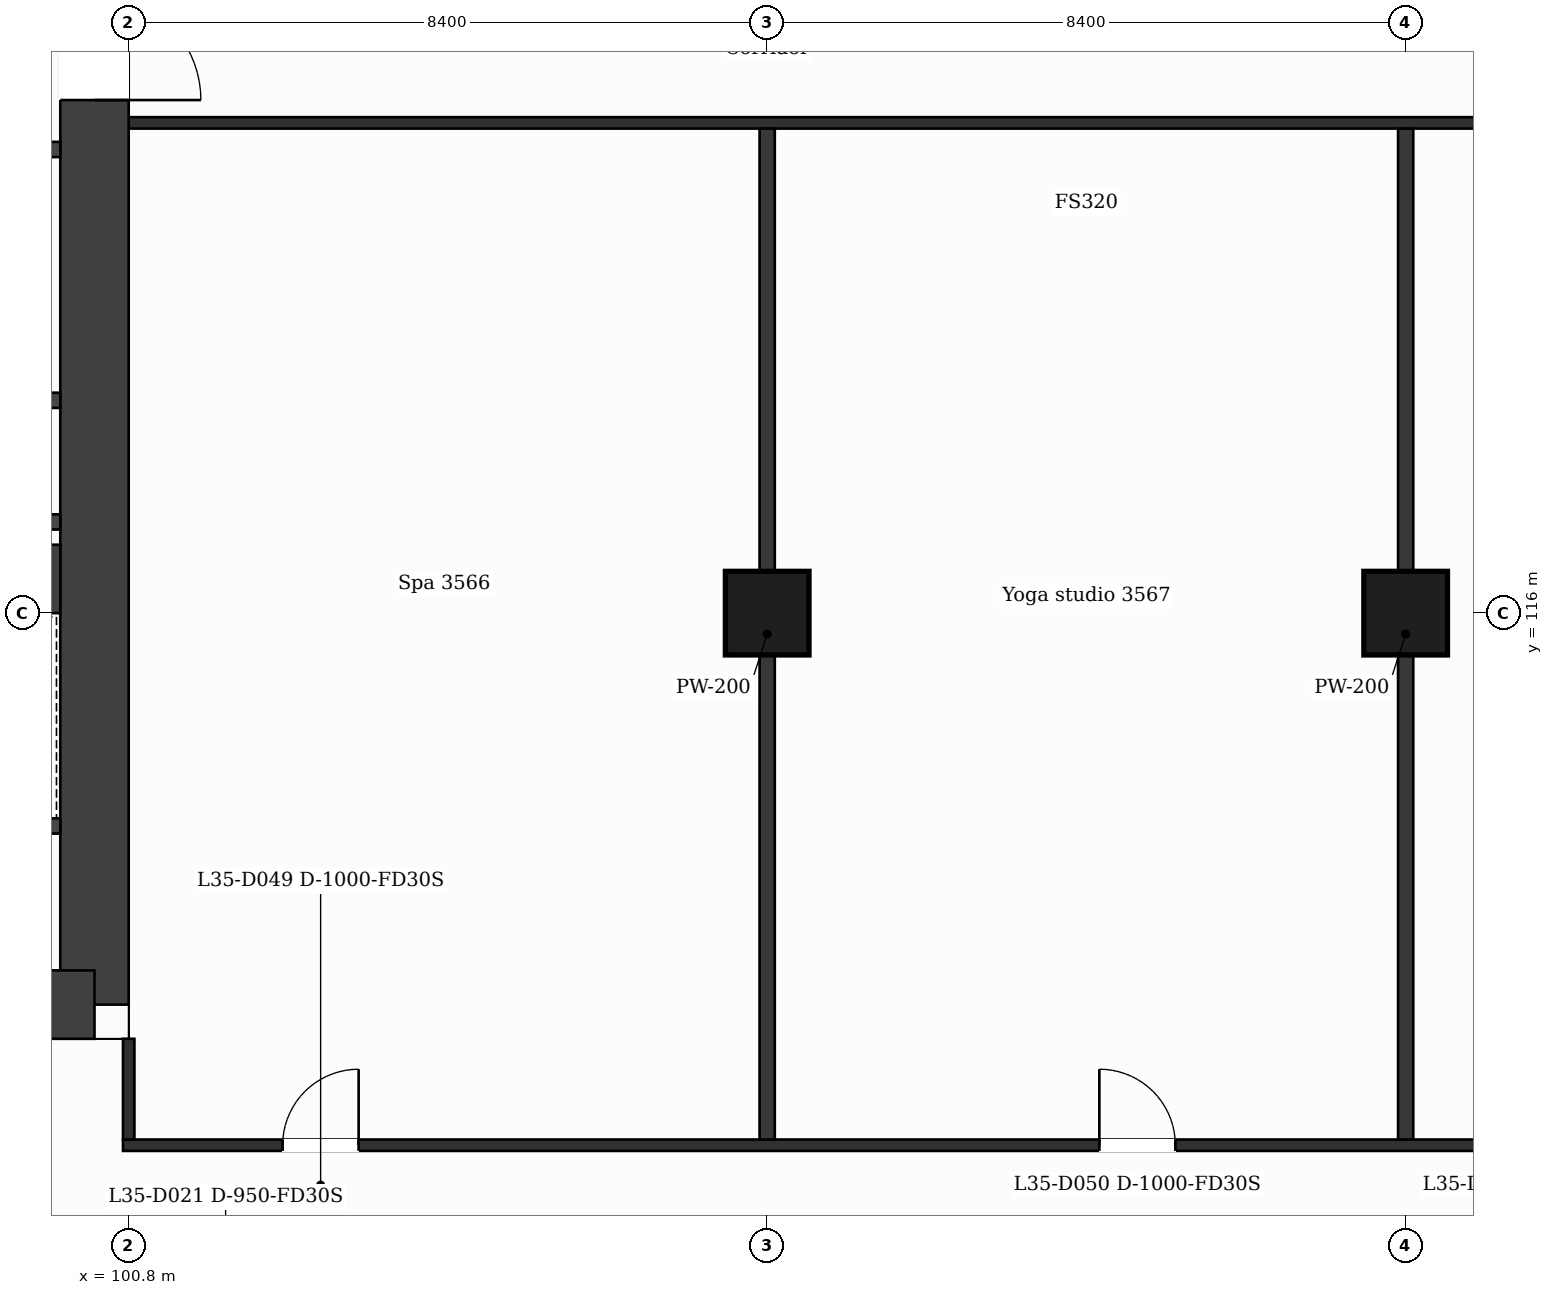
"""IFC4 building model, lengths in metres.
Left out: names, types, materials, properties, quantities, classifications, styles, units other than length and angle.
Written with IfcOpenShell. Run it as: python <this file> out.ifc"""

import sys

from ifc_helpers import new_model, si_unit, direction, frame, frame_2d, origin, origin_2d, place, context, subcontext, project, spatial, rectangle, extrude, element, fill, save


model = new_model("IFC4")
c1 = context("Model", 3, precision=1e-05, world=origin(), true_north=direction((0.0, 1.0)))
c2 = subcontext(c1, "Body", "Model", "MODEL_VIEW")
j1 = project(units=[si_unit("LENGTHUNIT", "METRE"), si_unit("PLANEANGLEUNIT", "RADIAN")], contexts=[c1])
p1 = place(None, origin())
s1 = spatial("IfcSite", under=j1, at=p1, CompositionType="ELEMENT")
p2 = place(p1, origin())
s2 = spatial("IfcBuilding", under=s1, at=p2, CompositionType="ELEMENT")
p3 = place(p2, frame((0.0, 0.0, 151.5)))
s3 = spatial("IfcBuildingStorey", under=s2, at=p3, CompositionType="ELEMENT", Elevation=151.5)
p4 = place(p3, frame((100.35, 131.95, 0.0), z_axis=(0.0, 0.0, 1.0), x_axis=(0.0, -1.0, 0.0)))
e1 = element("IfcWall", 1, at=p4, inside=s3, PredefinedType="SHEAR", context=c2, shape_type="SweptSolid", body=[
    extrude(rectangle(XDim=21.1, YDim=0.9, at=frame_2d((10.55, 0.0))), origin(), (0.0, 0.0, 1.0), 3.7),
])
p5 = place(p4, frame((7.8, 0.0, 0.0)))
e2 = element("IfcOpeningElement", 2, at=p5, cuts=e1, PredefinedType="OPENING", context=c2, shape_type="SweptSolid", body=[
    extrude(rectangle(XDim=1.4, YDim=2.1, at=frame_2d((0.7, 1.05))), frame((0.0, 0.46, 0.0), z_axis=(0.0, -1.0, 0.0), x_axis=(1.0, 0.0, 0.0)), (0.0, 0.0, 1.0), 0.92),
])
p6 = place(p3, frame((100.35, 110.85, 0.0), z_axis=(0.0, 0.0, 1.0), x_axis=(-1.0, 0.0, 0.0)))
e3 = element("IfcWall", 3, at=p6, inside=s3, PredefinedType="SHEAR", context=c2, shape_type="SweptSolid", body=[
    extrude(rectangle(XDim=14.166, YDim=0.9, at=frame_2d((7.083, 0.0))), origin(), (0.0, 0.0, 1.0), 3.7),
])
p7 = place(p6, frame((5.855, 0.0, 0.0)))
e4 = element("IfcOpeningElement", 4, at=p7, cuts=e3, PredefinedType="OPENING", context=c2, shape_type="SweptSolid", body=[
    extrude(rectangle(XDim=1.4, YDim=2.1, at=frame_2d((0.7, 1.05))), frame((0.0, 0.46, 0.0), z_axis=(0.0, -1.0, 0.0), x_axis=(1.0, 0.0, 0.0)), (0.0, 0.0, 1.0), 0.92),
])
p8 = place(p3, frame((94.8, 116.45, 0.0), z_axis=(0.0, 0.0, 1.0), x_axis=(1.0, 0.0, 0.0)))
e5 = element("IfcWall", 5, at=p8, inside=s3, PredefinedType="SHEAR", context=c2, shape_type="SweptSolid", body=[
    extrude(rectangle(XDim=5.1, YDim=0.9, at=frame_2d((2.55, 0.0))), origin(), (0.0, 0.0, 1.0), 3.7),
])
for number, where, z_axis, x_axis in (
    (6, (109.2, 116.0, 0.0), (0.0, 0.0, 1.0), (1.0, 0.0, 0.0)),
    (7, (117.6, 116.0, 0.0), (0.0, 0.0, 1.0), (1.0, 0.0, 0.0)),
):
    element("IfcColumn", number, at=place(p3, frame(where, z_axis=z_axis, x_axis=x_axis)), inside=s3, PredefinedType="COLUMN", context=c2, shape_type="SweptSolid", body=[
        extrude(rectangle(XDim=1.1, YDim=1.1, at=origin_2d()), origin(), (0.0, 0.0, 1.0), 3.7),
    ])
p9 = place(p3, frame((100.725, 109.0, 0.0), z_axis=(0.0, 0.0, 1.0), x_axis=(1.0, 0.0, 0.0)))
e8 = element("IfcWall", 8, at=p9, inside=s3, PredefinedType="PARTITIONING", context=c2, shape_type="SweptSolid", body=[
    extrude(rectangle(XDim=25.35, YDim=0.15, at=frame_2d((12.675, 0.0))), origin(), (0.0, 0.0, 1.0), 3.38),
])
p10 = place(p9, frame((2.1, 0.0, 0.0)))
e9 = element("IfcOpeningElement", 9, at=p10, cuts=e8, PredefinedType="OPENING", context=c2, shape_type="SweptSolid", body=[
    extrude(rectangle(XDim=1.0, YDim=2.1, at=frame_2d((0.5, 1.05))), frame((0.0, 0.085, 0.0), z_axis=(0.0, -1.0, 0.0), x_axis=(1.0, 0.0, 0.0)), (0.0, 0.0, 1.0), 0.17),
])
p11 = place(p9, frame((12.845, 0.0, 0.0)))
e10 = element("IfcOpeningElement", 10, at=p11, cuts=e8, PredefinedType="OPENING", context=c2, shape_type="SweptSolid", body=[
    extrude(rectangle(XDim=1.0, YDim=2.1, at=frame_2d((0.5, 1.05))), frame((0.0, 0.085, 0.0), z_axis=(0.0, -1.0, 0.0), x_axis=(1.0, 0.0, 0.0)), (0.0, 0.0, 1.0), 0.17),
])
p12 = place(p9, frame((18.225, 0.0, 0.0)))
e11 = element("IfcOpeningElement", 11, at=p12, cuts=e8, PredefinedType="OPENING", context=c2, shape_type="SweptSolid", body=[
    extrude(rectangle(XDim=1.0, YDim=2.1, at=frame_2d((0.5, 1.05))), frame((0.0, 0.085, 0.0), z_axis=(0.0, -1.0, 0.0), x_axis=(1.0, 0.0, 0.0)), (0.0, 0.0, 1.0), 0.17),
])
p13 = place(p9, frame((22.675, 0.0, 0.0)))
e12 = element("IfcOpeningElement", 12, at=p13, cuts=e8, PredefinedType="OPENING", context=c2, shape_type="SweptSolid", body=[
    extrude(rectangle(XDim=1.0, YDim=2.1, at=frame_2d((0.5, 1.05))), frame((0.0, 0.085, 0.0), z_axis=(0.0, -1.0, 0.0), x_axis=(1.0, 0.0, 0.0)), (0.0, 0.0, 1.0), 0.17),
])
p14 = place(p3, frame((95.127, 113.2, 0.0), z_axis=(0.0, 0.0, 1.0), x_axis=(1.0, 0.0, 0.0)))
e13 = element("IfcWall", 13, at=p14, inside=s3, PredefinedType="PARTITIONING", context=c2, shape_type="SweptSolid", body=[
    extrude(rectangle(XDim=4.773, YDim=0.2, at=frame_2d((2.386, 0.0))), origin(), (0.0, 0.0, 1.0), 3.38),
])
p15 = place(p14, frame((2.921, 0.0, 0.0)))
e14 = element("IfcOpeningElement", 14, at=p15, cuts=e13, PredefinedType="OPENING", context=c2, shape_type="SweptSolid", body=[
    extrude(rectangle(XDim=1.1, YDim=2.1, at=frame_2d((0.55, 1.05))), frame((0.0, 0.11, 0.0), z_axis=(0.0, -1.0, 0.0), x_axis=(1.0, 0.0, 0.0)), (0.0, 0.0, 1.0), 0.22),
])
for number, where, z_axis, x_axis in (
    (15, (95.227, 117.2, 0.0), (0.0, 0.0, 1.0), (1.0, 0.0, 0.0)),
    (16, (95.227, 118.8, 0.0), (0.0, 0.0, 1.0), (1.0, 0.0, 0.0)),
):
    element("IfcWall", number, at=place(p3, frame(where, z_axis=z_axis, x_axis=x_axis)), inside=s3, PredefinedType="PARTITIONING", context=c2, shape_type="SweptSolid", body=[
        extrude(rectangle(XDim=4.673, YDim=0.2, at=frame_2d((2.336, 0.0))), origin(), (0.0, 0.0, 1.0), 3.38),
    ])
p16 = place(p3, frame((95.227, 122.1, 0.0), z_axis=(0.0, 0.0, 1.0), x_axis=(1.0, 0.0, 0.0)))
e17 = element("IfcWall", 17, at=p16, inside=s3, PredefinedType="PARTITIONING", context=c2, shape_type="SweptSolid", body=[
    extrude(rectangle(XDim=4.673, YDim=0.2, at=frame_2d((2.336, 0.0))), origin(), (0.0, 0.0, 1.0), 3.38),
])
p17 = place(p16, frame((0.718, 0.0, 0.0)))
e18 = element("IfcOpeningElement", 18, at=p17, cuts=e17, PredefinedType="OPENING", context=c2, shape_type="SweptSolid", body=[
    extrude(rectangle(XDim=0.9, YDim=2.1, at=frame_2d((0.45, 1.05))), frame((0.0, 0.11, 0.0), z_axis=(0.0, -1.0, 0.0), x_axis=(1.0, 0.0, 0.0)), (0.0, 0.0, 1.0), 0.22),
])
p18 = place(p16, frame((3.055, 0.0, 0.0)))
e19 = element("IfcOpeningElement", 19, at=p18, cuts=e17, PredefinedType="OPENING", context=c2, shape_type="SweptSolid", body=[
    extrude(rectangle(XDim=0.9, YDim=2.1, at=frame_2d((0.45, 1.05))), frame((0.0, 0.11, 0.0), z_axis=(0.0, -1.0, 0.0), x_axis=(1.0, 0.0, 0.0)), (0.0, 0.0, 1.0), 0.22),
])
p19 = place(p3, frame((100.8, 122.45, 0.0), z_axis=(0.0, 0.0, 1.0), x_axis=(1.0, 0.0, 0.0)))
e20 = element("IfcWall", 20, at=p19, inside=s3, PredefinedType="PARTITIONING", context=c2, shape_type="SweptSolid", body=[
    extrude(rectangle(XDim=25.2, YDim=0.15, at=frame_2d((12.6, 0.0))), origin(), (0.0, 0.0, 1.0), 3.38),
])
p20 = place(p3, frame((100.8, 109.075, 0.0), z_axis=(0.0, 0.0, 1.0), x_axis=(0.0, 1.0, 0.0)))
e21 = element("IfcWall", 21, at=p20, inside=s3, PredefinedType="PARTITIONING", context=c2, shape_type="SweptSolid", body=[
    extrude(rectangle(XDim=1.325, YDim=0.15, at=frame_2d((0.663, 0.0))), origin(), (0.0, 0.0, 1.0), 3.38),
])
for number, where, z_axis, x_axis in (
    (22, (109.2, 109.075, 0.0), (0.0, 0.0, 1.0), (0.0, 1.0, 0.0)),
    (23, (117.6, 109.075, 0.0), (0.0, 0.0, 1.0), (0.0, 1.0, 0.0)),
):
    element("IfcWall", number, at=place(p3, frame(where, z_axis=z_axis, x_axis=x_axis)), inside=s3, PredefinedType="PARTITIONING", context=c2, shape_type="SweptSolid", body=[
        extrude(rectangle(XDim=13.3, YDim=0.2, at=frame_2d((6.65, 0.0))), origin(), (0.0, 0.0, 1.0), 3.38),
    ])
p21 = place(p10, origin())
e24 = element("IfcDoor", 24, at=p21, inside=s3, OperationType="SINGLE_SWING_RIGHT", PredefinedType="DOOR", context=c2, shape_type="SweptSolid", body=[
    extrude(rectangle(XDim=1.0, YDim=2.1, at=frame_2d((0.5, 1.05))), frame((0.0, 0.025, 0.0), z_axis=(0.0, -1.0, 0.0), x_axis=(1.0, 0.0, 0.0)), (0.0, 0.0, 1.0), 0.05),
])
fill(e9, e24)
p22 = place(p11, origin())
e25 = element("IfcDoor", 25, at=p22, inside=s3, OperationType="SINGLE_SWING_LEFT", PredefinedType="DOOR", context=c2, shape_type="SweptSolid", body=[
    extrude(rectangle(XDim=1.0, YDim=2.1, at=frame_2d((0.5, 1.05))), frame((0.0, 0.025, 0.0), z_axis=(0.0, -1.0, 0.0), x_axis=(1.0, 0.0, 0.0)), (0.0, 0.0, 1.0), 0.05),
])
fill(e10, e25)
p23 = place(p5, origin())
e26 = element("IfcDoor", 26, at=p23, inside=s3, OperationType="SINGLE_SWING_RIGHT", PredefinedType="DOOR", context=c2, shape_type="SweptSolid", body=[
    extrude(rectangle(XDim=1.4, YDim=2.1, at=frame_2d((0.7, 1.05))), frame((0.0, 0.025, 0.0), z_axis=(0.0, -1.0, 0.0), x_axis=(1.0, 0.0, 0.0)), (0.0, 0.0, 1.0), 0.05),
])
fill(e2, e26)
save(model, sys.argv[1])
